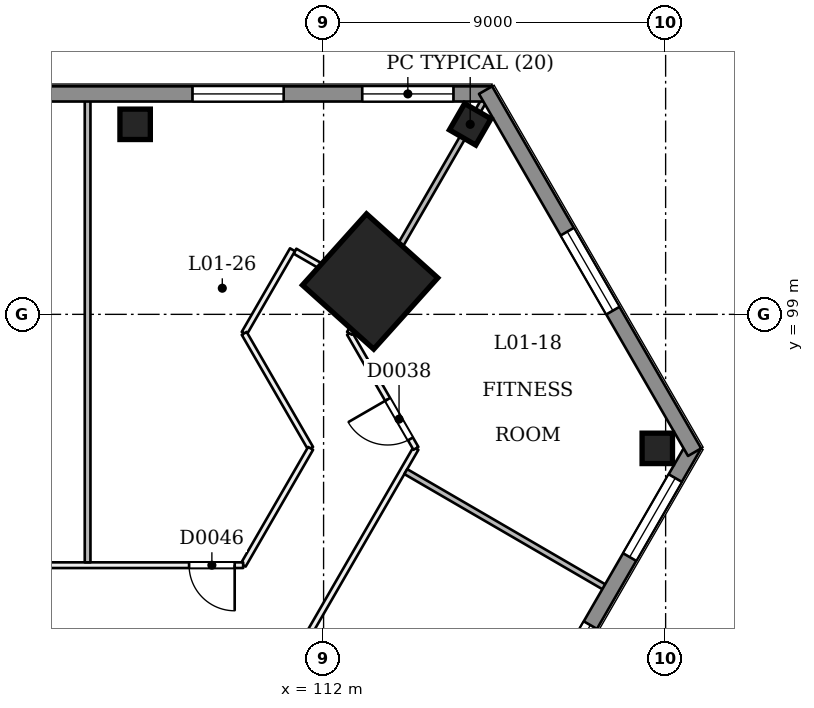
"""IFC4 building model, lengths in metres.
Left out: names, types, materials, properties, quantities, classifications, styles, units other than length and angle.
Written with IfcOpenShell. Run it as: python <this file> out.ifc"""

import sys

from ifc_helpers import new_model, si_unit, direction, frame, frame_2d, origin, origin_2d, place, context, subcontext, project, spatial, rectangle, extrude, element, fill, save


model = new_model("IFC4")
c1 = context("Model", 3, precision=1e-05, world=origin(), true_north=direction((0.0, 1.0)))
c2 = subcontext(c1, "Body", "Model", "MODEL_VIEW")
j1 = project(units=[si_unit("LENGTHUNIT", "METRE"), si_unit("PLANEANGLEUNIT", "RADIAN")], contexts=[c1])
p1 = place(None, origin())
s1 = spatial("IfcSite", under=j1, at=p1, CompositionType="ELEMENT")
p2 = place(p1, origin())
s2 = spatial("IfcBuilding", under=s1, at=p2, CompositionType="ELEMENT")
p3 = place(p2, frame((0.0, 0.0, 9.0)))
s3 = spatial("IfcBuildingStorey", under=s2, at=p3, CompositionType="ELEMENT", Elevation=9.0)
p4 = place(p3, frame((113.259, 99.853, 0.0), z_axis=(-0.028416130736, 0.009218973712, 0.999553667412), x_axis=(0.500876370668, -0.86523358539, 0.022219451375)))
e1 = element("IfcColumn", 1, at=p4, inside=s3, PredefinedType="COLUMN", context=c2, shape_type="SweptSolid", body=[
    extrude(rectangle(XDim=2.52, YDim=2.52, at=origin_2d()), origin(), (0.0, 0.0, 1.0), 4.502),
])
for number, where, z_axis, x_axis in (
    (2, (115.858, 104.0, 0.0), (0.0, 0.0, 1.0), (0.5, 0.866, 0.0)),
    (3, (107.041, 104.0, 0.0), (0.0, 0.0, 1.0), (1.0, 0.0, 0.0)),
    (4, (120.781, 95.474, 0.0), (0.0, 0.0, 1.0), (1.745e-08, 1.0, 0.0)),
):
    element("IfcColumn", number, at=place(p3, frame(where, z_axis=z_axis, x_axis=x_axis)), inside=s3, PredefinedType="COLUMN", context=c2, shape_type="SweptSolid", body=[
        extrude(rectangle(XDim=0.8, YDim=0.8, at=origin_2d()), origin(), (0.0, 0.0, 1.0), 4.5),
    ])
p5 = place(p3, frame((86.747, 47.526, 0.0), z_axis=(0.0, 0.0, 1.0), x_axis=(0.500000085768, 0.866025354266, 0.0)))
e5 = element("IfcWall", 5, at=p5, inside=s3, PredefinedType="PARTITIONING", context=c2, shape_type="SweptSolid", body=[
    extrude(rectangle(XDim=55.365, YDim=0.15, at=frame_2d((27.682, 0.0))), origin(), (0.0, 0.0, 1.0), 4.05),
])
p6 = place(p5, frame((0.97, 0.0, 0.0)))
e6 = element("IfcOpeningElement", 6, at=p6, cuts=e5, PredefinedType="OPENING", context=c2, shape_type="SweptSolid", body=[
    extrude(rectangle(XDim=1.2, YDim=2.1, at=frame_2d((0.6, 1.05))), frame((0.0, 0.085, 0.0), z_axis=(0.0, -1.0, 0.0), x_axis=(1.0, 0.0, 0.0)), (0.0, 0.0, 1.0), 0.171),
])
p7 = place(p5, frame((9.082, 0.0, 0.0)))
e7 = element("IfcOpeningElement", 7, at=p7, cuts=e5, PredefinedType="OPENING", context=c2, shape_type="SweptSolid", body=[
    extrude(rectangle(XDim=1.2, YDim=2.1, at=frame_2d((0.6, 1.05))), frame((0.0, 0.085, 0.0), z_axis=(0.0, -1.0, 0.0), x_axis=(1.0, 0.0, 0.0)), (0.0, 0.0, 1.0), 0.171),
])
p8 = place(p5, frame((18.082, 0.0, 0.0)))
e8 = element("IfcOpeningElement", 8, at=p8, cuts=e5, PredefinedType="OPENING", context=c2, shape_type="SweptSolid", body=[
    extrude(rectangle(XDim=1.2, YDim=2.1, at=frame_2d((0.6, 1.05))), frame((0.0, 0.085, 0.0), z_axis=(0.0, -1.0, 0.0), x_axis=(1.0, 0.0, 0.0)), (0.0, 0.0, 1.0), 0.171),
])
p9 = place(p5, frame((23.613, 0.0, 0.0)))
e9 = element("IfcOpeningElement", 9, at=p9, cuts=e5, PredefinedType="OPENING", context=c2, shape_type="SweptSolid", body=[
    extrude(rectangle(XDim=1.0, YDim=2.1, at=frame_2d((0.5, 1.05))), frame((0.0, 0.085, 0.0), z_axis=(0.0, -1.0, 0.0), x_axis=(1.0, 0.0, 0.0)), (0.0, 0.0, 1.0), 0.171),
])
p10 = place(p5, frame((26.363, 0.0, 0.0)))
e10 = element("IfcOpeningElement", 10, at=p10, cuts=e5, PredefinedType="OPENING", context=c2, shape_type="SweptSolid", body=[
    extrude(rectangle(XDim=1.0, YDim=2.1, at=frame_2d((0.5, 1.05))), frame((0.0, 0.085, 0.0), z_axis=(0.0, -1.0, 0.0), x_axis=(1.0, 0.0, 0.0)), (0.0, 0.0, 1.0), 0.171),
])
p11 = place(p5, frame((33.032, 0.0, 0.0)))
e11 = element("IfcOpeningElement", 11, at=p11, cuts=e5, PredefinedType="OPENING", context=c2, shape_type="SweptSolid", body=[
    extrude(rectangle(XDim=1.2, YDim=2.1, at=frame_2d((0.6, 1.05))), frame((0.0, 0.085, 0.0), z_axis=(0.0, -1.0, 0.0), x_axis=(1.0, 0.0, 0.0)), (0.0, 0.0, 1.0), 0.171),
])
p12 = place(p5, frame((47.337, 0.0, 0.0)))
e12 = element("IfcOpeningElement", 12, at=p12, cuts=e5, PredefinedType="OPENING", context=c2, shape_type="SweptSolid", body=[
    extrude(rectangle(XDim=1.2, YDim=2.1, at=frame_2d((0.6, 1.05))), frame((0.0, 0.085, 0.0), z_axis=(0.0, -1.0, 0.0), x_axis=(1.0, 0.0, 0.0)), (0.0, 0.0, 1.0), 0.171),
])
p13 = place(p3, frame((114.43, 95.474, 0.0), z_axis=(0.0, 0.0, 1.0), x_axis=(-0.500008701212, 0.866020380079, 0.0)))
e13 = element("IfcWall", 13, at=p13, inside=s3, PredefinedType="PARTITIONING", context=c2, shape_type="SweptSolid", body=[
    extrude(rectangle(XDim=3.495, YDim=0.15, at=frame_2d((1.747, 0.0))), origin(), (0.0, 0.0, 1.0), 4.05),
])
p14 = place(p13, frame((0.288, 0.0, 0.0)))
e14 = element("IfcOpeningElement", 14, at=p14, cuts=e13, PredefinedType="OPENING", context=c2, shape_type="SweptSolid", body=[
    extrude(rectangle(XDim=1.2, YDim=2.1, at=frame_2d((0.6, 1.05))), frame((0.0, 0.085, 0.0), z_axis=(0.0, -1.0, 0.0), x_axis=(1.0, 0.0, 0.0)), (0.0, 0.0, 1.0), 0.171),
])
p15 = place(p3, frame((112.682, 98.5, 0.0), z_axis=(0.0, 0.0, 1.0), x_axis=(0.500126914667, 0.865952117167, 0.0)))
e15 = element("IfcWall", 15, at=p15, inside=s3, PredefinedType="PARTITIONING", context=c2, shape_type="SweptSolid", body=[
    extrude(rectangle(XDim=1.08, YDim=0.15, at=frame_2d((0.54, 0.0))), origin(), (0.0, 0.0, 1.0), 4.05),
])
p16 = place(p3, frame((113.195, 99.538, 0.0), z_axis=(0.0, 0.0, 1.0), x_axis=(-0.866017533419, 0.500013631625, 0.0)))
e16 = element("IfcWall", 16, at=p16, inside=s3, PredefinedType="PARTITIONING", context=c2, shape_type="SweptSolid", body=[
    extrude(rectangle(XDim=2.25, YDim=0.15, at=frame_2d((1.125, 0.0))), origin(), (0.0, 0.0, 1.0), 4.05),
])
p17 = place(p3, frame((111.181, 100.7, 0.0), z_axis=(0.0, 0.0, 1.0), x_axis=(-0.500035802948, -0.866004731956, 0.0)))
e17 = element("IfcWall", 17, at=p17, inside=s3, PredefinedType="PARTITIONING", context=c2, shape_type="SweptSolid", body=[
    extrude(rectangle(XDim=2.54, YDim=0.15, at=frame_2d((1.27, 0.0))), origin(), (0.0, 0.0, 1.0), 4.05),
])
p18 = place(p3, frame((109.911, 98.5, 0.0), z_axis=(0.0, 0.0, 1.0), x_axis=(0.500008701212, -0.866020380079, 0.0)))
e18 = element("IfcWall", 18, at=p18, inside=s3, PredefinedType="PARTITIONING", context=c2, shape_type="SweptSolid", body=[
    extrude(rectangle(XDim=3.495, YDim=0.15, at=frame_2d((1.747, 0.0))), origin(), (0.0, 0.0, 1.0), 4.05),
])
p19 = place(p3, frame((111.658, 95.474, 0.0), z_axis=(0.0, 0.0, 1.0), x_axis=(-0.500008260065, -0.866020634781, 0.0)))
e19 = element("IfcWall", 19, at=p19, inside=s3, PredefinedType="PARTITIONING", context=c2, shape_type="SweptSolid", body=[
    extrude(rectangle(XDim=3.549, YDim=0.15, at=frame_2d((1.775, 0.0))), origin(), (0.0, 0.0, 1.0), 4.05),
])
p20 = place(p3, frame((109.884, 92.4, 0.0), z_axis=(0.0, 0.0, 1.0), x_axis=(-1.0, 0.0, 0.0)))
e20 = element("IfcWall", 20, at=p20, inside=s3, PredefinedType="PARTITIONING", context=c2, shape_type="SweptSolid", body=[
    extrude(rectangle(XDim=10.084, YDim=0.15, at=frame_2d((5.042, 0.0))), origin(), (0.0, 0.0, 1.0), 4.05),
])
p21 = place(p20, frame((0.223, 0.0, 0.0)))
e21 = element("IfcOpeningElement", 21, at=p21, cuts=e20, PredefinedType="OPENING", context=c2, shape_type="SweptSolid", body=[
    extrude(rectangle(XDim=1.2, YDim=2.1, at=frame_2d((0.6, 1.05))), frame((0.0, 0.085, 0.0), z_axis=(0.0, -1.0, 0.0), x_axis=(1.0, 0.0, 0.0)), (0.0, 0.0, 1.0), 0.171),
])
p22 = place(p20, frame((6.796, 0.0, 0.0)))
e22 = element("IfcOpeningElement", 22, at=p22, cuts=e20, PredefinedType="OPENING", context=c2, shape_type="SweptSolid", body=[
    extrude(rectangle(XDim=1.2, YDim=2.1, at=frame_2d((0.6, 1.05))), frame((0.0, 0.085, 0.0), z_axis=(0.0, -1.0, 0.0), x_axis=(1.0, 0.0, 0.0)), (0.0, 0.0, 1.0), 0.171),
])
p23 = place(p3, frame((119.631, 91.683, 0.0), z_axis=(0.0, 0.0, 1.0), x_axis=(-0.864489243455, 0.502651318462, 0.0)))
e23 = element("IfcWall", 23, at=p23, inside=s3, PredefinedType="PARTITIONING", context=c2, shape_type="SweptSolid", body=[
    extrude(rectangle(XDim=6.325, YDim=0.15, at=frame_2d((3.163, 0.0))), origin(), (0.0, 0.0, 1.0), 4.05),
])
p24 = place(p3, frame((116.377, 104.9, 0.0), z_axis=(0.0, 0.0, 1.0), x_axis=(-0.500004896655, -0.866022576681, 0.0)))
e24 = element("IfcWall", 24, at=p24, inside=s3, PredefinedType="PARTITIONING", context=c2, shape_type="SweptSolid", body=[
    extrude(rectangle(XDim=6.235, YDim=0.15, at=frame_2d((3.118, 0.0))), origin(), (0.0, 0.0, 1.0), 4.05),
])
p25 = place(p3, frame((105.791, 104.9, 0.0), z_axis=(0.0, 0.0, 1.0), x_axis=(0.0, -1.0, 0.0)))
e25 = element("IfcWall", 25, at=p25, inside=s3, PredefinedType="PARTITIONING", context=c2, shape_type="SweptSolid", body=[
    extrude(rectangle(XDim=12.425, YDim=0.15, at=frame_2d((6.212, 0.0))), origin(), (0.0, 0.0, 1.0), 4.05),
])
p26 = place(p3, frame((53.565, 104.8, 0.0), z_axis=(0.0, 0.0, 1.0), x_axis=(1.0, 0.0, 0.0)))
e26 = element("IfcWall", 26, at=p26, inside=s3, PredefinedType="SOLIDWALL", context=c2, shape_type="SweptSolid", body=[
    extrude(rectangle(XDim=62.871, YDim=0.4, at=frame_2d((31.435, 0.0))), origin(), (0.0, 0.0, 1.0), 4.05),
])
p27 = place(p26, frame((59.452, 0.0, 0.9)))
e27 = element("IfcOpeningElement", 27, at=p27, cuts=e26, PredefinedType="OPENING", context=c2, shape_type="SweptSolid", body=[
    extrude(rectangle(XDim=2.4, YDim=1.5, at=frame_2d((1.2, 0.75))), frame((0.0, 0.21, 0.0), z_axis=(0.0, -1.0, 0.0), x_axis=(1.0, 0.0, 0.0)), (0.0, 0.0, 1.0), 0.421),
])
p28 = place(p26, frame((54.986, 0.0, 0.9)))
e28 = element("IfcOpeningElement", 28, at=p28, cuts=e26, PredefinedType="OPENING", context=c2, shape_type="SweptSolid", body=[
    extrude(rectangle(XDim=2.4, YDim=1.5, at=frame_2d((1.2, 0.75))), frame((0.0, 0.21, 0.0), z_axis=(0.0, -1.0, 0.0), x_axis=(1.0, 0.0, 0.0)), (0.0, 0.0, 1.0), 0.421),
])
p29 = place(p26, frame((45.986, 0.0, 0.9)))
e29 = element("IfcOpeningElement", 29, at=p29, cuts=e26, PredefinedType="OPENING", context=c2, shape_type="SweptSolid", body=[
    extrude(rectangle(XDim=2.4, YDim=1.5, at=frame_2d((1.2, 0.75))), frame((0.0, 0.21, 0.0), z_axis=(0.0, -1.0, 0.0), x_axis=(1.0, 0.0, 0.0)), (0.0, 0.0, 1.0), 0.421),
])
p30 = place(p26, frame((14.486, 0.0, 0.9)))
e30 = element("IfcOpeningElement", 30, at=p30, cuts=e26, PredefinedType="OPENING", context=c2, shape_type="SweptSolid", body=[
    extrude(rectangle(XDim=2.4, YDim=1.5, at=frame_2d((1.2, 0.75))), frame((0.0, 0.21, 0.0), z_axis=(0.0, -1.0, 0.0), x_axis=(1.0, 0.0, 0.0)), (0.0, 0.0, 1.0), 0.421),
])
p31 = place(p26, frame((1.018, 0.0, 0.9)))
e31 = element("IfcOpeningElement", 31, at=p31, cuts=e26, PredefinedType="OPENING", context=c2, shape_type="SweptSolid", body=[
    extrude(rectangle(XDim=2.4, YDim=1.5, at=frame_2d((1.2, 0.75))), frame((0.0, 0.21, 0.0), z_axis=(0.0, -1.0, 0.0), x_axis=(1.0, 0.0, 0.0)), (0.0, 0.0, 1.0), 0.421),
])
p32 = place(p3, frame((121.762, 95.574, 0.0), z_axis=(0.0, 0.0, 1.0), x_axis=(-0.499997306052, -0.866026959131, 0.0)))
e32 = element("IfcWall", 32, at=p32, inside=s3, PredefinedType="SOLIDWALL", context=c2, shape_type="SweptSolid", body=[
    extrude(rectangle(XDim=62.87, YDim=0.4, at=frame_2d((31.435, 0.0))), origin(), (0.0, 0.0, 1.0), 4.05),
])
p33 = place(p32, frame((59.452, 0.0, 0.9)))
e33 = element("IfcOpeningElement", 33, at=p33, cuts=e32, PredefinedType="OPENING", context=c2, shape_type="SweptSolid", body=[
    extrude(rectangle(XDim=2.4, YDim=1.5, at=frame_2d((1.2, 0.75))), frame((0.0, 0.21, 0.0), z_axis=(0.0, -1.0, 0.0), x_axis=(1.0, 0.0, 0.0)), (0.0, 0.0, 1.0), 0.421),
])
p34 = place(p32, frame((54.986, 0.0, 0.9)))
e34 = element("IfcOpeningElement", 34, at=p34, cuts=e32, PredefinedType="OPENING", context=c2, shape_type="SweptSolid", body=[
    extrude(rectangle(XDim=2.4, YDim=1.5, at=frame_2d((1.2, 0.75))), frame((0.0, 0.21, 0.0), z_axis=(0.0, -1.0, 0.0), x_axis=(1.0, 0.0, 0.0)), (0.0, 0.0, 1.0), 0.421),
])
p35 = place(p32, frame((50.486, 0.0, 0.9)))
e35 = element("IfcOpeningElement", 35, at=p35, cuts=e32, PredefinedType="OPENING", context=c2, shape_type="SweptSolid", body=[
    extrude(rectangle(XDim=2.4, YDim=1.5, at=frame_2d((1.2, 0.75))), frame((0.0, 0.21, 0.0), z_axis=(0.0, -1.0, 0.0), x_axis=(1.0, 0.0, 0.0)), (0.0, 0.0, 1.0), 0.421),
])
p36 = place(p32, frame((45.986, 0.0, 0.9)))
e36 = element("IfcOpeningElement", 36, at=p36, cuts=e32, PredefinedType="OPENING", context=c2, shape_type="SweptSolid", body=[
    extrude(rectangle(XDim=2.4, YDim=1.5, at=frame_2d((1.2, 0.75))), frame((0.0, 0.21, 0.0), z_axis=(0.0, -1.0, 0.0), x_axis=(1.0, 0.0, 0.0)), (0.0, 0.0, 1.0), 0.421),
])
p37 = place(p32, frame((41.486, 0.0, 0.9)))
e37 = element("IfcOpeningElement", 37, at=p37, cuts=e32, PredefinedType="OPENING", context=c2, shape_type="SweptSolid", body=[
    extrude(rectangle(XDim=2.4, YDim=1.5, at=frame_2d((1.2, 0.75))), frame((0.0, 0.21, 0.0), z_axis=(0.0, -1.0, 0.0), x_axis=(1.0, 0.0, 0.0)), (0.0, 0.0, 1.0), 0.421),
])
p38 = place(p32, frame((36.986, 0.0, 0.9)))
e38 = element("IfcOpeningElement", 38, at=p38, cuts=e32, PredefinedType="OPENING", context=c2, shape_type="SweptSolid", body=[
    extrude(rectangle(XDim=2.4, YDim=1.5, at=frame_2d((1.2, 0.75))), frame((0.0, 0.21, 0.0), z_axis=(0.0, -1.0, 0.0), x_axis=(1.0, 0.0, 0.0)), (0.0, 0.0, 1.0), 0.421),
])
p39 = place(p32, frame((23.486, 0.0, 0.9)))
e39 = element("IfcOpeningElement", 39, at=p39, cuts=e32, PredefinedType="OPENING", context=c2, shape_type="SweptSolid", body=[
    extrude(rectangle(XDim=2.4, YDim=1.5, at=frame_2d((1.2, 0.75))), frame((0.0, 0.21, 0.0), z_axis=(0.0, -1.0, 0.0), x_axis=(1.0, 0.0, 0.0)), (0.0, 0.0, 1.0), 0.421),
])
p40 = place(p32, frame((18.986, 0.0, 0.9)))
e40 = element("IfcOpeningElement", 40, at=p40, cuts=e32, PredefinedType="OPENING", context=c2, shape_type="SweptSolid", body=[
    extrude(rectangle(XDim=2.4, YDim=1.5, at=frame_2d((1.2, 0.75))), frame((0.0, 0.21, 0.0), z_axis=(0.0, -1.0, 0.0), x_axis=(1.0, 0.0, 0.0)), (0.0, 0.0, 1.0), 0.421),
])
p41 = place(p32, frame((14.486, 0.0, 0.9)))
e41 = element("IfcOpeningElement", 41, at=p41, cuts=e32, PredefinedType="OPENING", context=c2, shape_type="SweptSolid", body=[
    extrude(rectangle(XDim=2.4, YDim=1.5, at=frame_2d((1.2, 0.75))), frame((0.0, 0.21, 0.0), z_axis=(0.0, -1.0, 0.0), x_axis=(1.0, 0.0, 0.0)), (0.0, 0.0, 1.0), 0.421),
])
p42 = place(p32, frame((5.486, 0.0, 0.9)))
e42 = element("IfcOpeningElement", 42, at=p42, cuts=e32, PredefinedType="OPENING", context=c2, shape_type="SweptSolid", body=[
    extrude(rectangle(XDim=2.4, YDim=1.5, at=frame_2d((1.2, 0.75))), frame((0.0, 0.21, 0.0), z_axis=(0.0, -1.0, 0.0), x_axis=(1.0, 0.0, 0.0)), (0.0, 0.0, 1.0), 0.421),
])
p43 = place(p32, frame((1.018, 0.0, 0.9)))
e43 = element("IfcOpeningElement", 43, at=p43, cuts=e32, PredefinedType="OPENING", context=c2, shape_type="SweptSolid", body=[
    extrude(rectangle(XDim=2.4, YDim=1.5, at=frame_2d((1.2, 0.75))), frame((0.0, 0.21, 0.0), z_axis=(0.0, -1.0, 0.0), x_axis=(1.0, 0.0, 0.0)), (0.0, 0.0, 1.0), 0.421),
])
p44 = place(p3, frame((116.262, 104.9, 0.0), z_axis=(0.0, 0.0, 1.0), x_axis=(0.50000615651, -0.866021849293, 0.0)))
e44 = element("IfcWall", 44, at=p44, inside=s3, PredefinedType="SOLIDWALL", context=c2, shape_type="SweptSolid", body=[
    extrude(rectangle(XDim=11.0, YDim=0.4, at=frame_2d((5.5, 0.0))), origin(), (0.0, 0.0, 1.0), 4.05),
])
p45 = place(p44, frame((4.3, 0.0, 0.9)))
e45 = element("IfcOpeningElement", 45, at=p45, cuts=e44, PredefinedType="OPENING", context=c2, shape_type="SweptSolid", body=[
    extrude(rectangle(XDim=2.4, YDim=1.5, at=frame_2d((1.2, 0.75))), frame((0.0, 0.21, 0.0), z_axis=(0.0, -1.0, 0.0), x_axis=(1.0, 0.0, 0.0)), (0.0, 0.0, 1.0), 0.421),
])
p46 = place(p14, origin())
e46 = element("IfcDoor", 46, at=p46, inside=s3, OperationType="SINGLE_SWING_RIGHT", PredefinedType="NOTDEFINED", context=c2, shape_type="SweptSolid", body=[
    extrude(rectangle(XDim=1.2, YDim=2.1, at=frame_2d((0.6, 1.05))), frame((0.0, 0.025, 0.0), z_axis=(0.0, -1.0, 0.0), x_axis=(1.0, 0.0, 0.0)), (0.0, 0.0, 1.0), 0.05),
])
fill(e14, e46)
p47 = place(p21, origin())
e47 = element("IfcDoor", 47, at=p47, inside=s3, OperationType="SINGLE_SWING_LEFT", PredefinedType="NOTDEFINED", context=c2, shape_type="SweptSolid", body=[
    extrude(rectangle(XDim=1.2, YDim=2.1, at=frame_2d((0.6, 1.05))), frame((0.0, 0.025, 0.0), z_axis=(0.0, -1.0, 0.0), x_axis=(1.0, 0.0, 0.0)), (0.0, 0.0, 1.0), 0.05),
])
fill(e21, e47)
p48 = place(p27, origin())
e48 = element("IfcWindow", 48, at=p48, inside=s3, PartitioningType="SINGLE_PANEL", PredefinedType="WINDOW", context=c2, shape_type="SweptSolid", body=[
    extrude(rectangle(XDim=2.4, YDim=1.5, at=frame_2d((1.2, 0.75))), frame((0.0, 0.03, 0.0), z_axis=(0.0, -1.0, 0.0), x_axis=(1.0, 0.0, 0.0)), (0.0, 0.0, 1.0), 0.06),
])
fill(e27, e48)
p49 = place(p28, origin())
e49 = element("IfcWindow", 49, at=p49, inside=s3, PartitioningType="SINGLE_PANEL", PredefinedType="WINDOW", context=c2, shape_type="SweptSolid", body=[
    extrude(rectangle(XDim=2.4, YDim=1.5, at=frame_2d((1.2, 0.75))), frame((0.0, 0.03, 0.0), z_axis=(0.0, -1.0, 0.0), x_axis=(1.0, 0.0, 0.0)), (0.0, 0.0, 1.0), 0.06),
])
fill(e28, e49)
p50 = place(p42, origin())
e50 = element("IfcWindow", 50, at=p50, inside=s3, PartitioningType="SINGLE_PANEL", PredefinedType="WINDOW", context=c2, shape_type="SweptSolid", body=[
    extrude(rectangle(XDim=2.4, YDim=1.5, at=frame_2d((1.2, 0.75))), frame((0.0, 0.03, 0.0), z_axis=(0.0, -1.0, 0.0), x_axis=(1.0, 0.0, 0.0)), (0.0, 0.0, 1.0), 0.06),
])
fill(e42, e50)
p51 = place(p43, origin())
e51 = element("IfcWindow", 51, at=p51, inside=s3, PartitioningType="SINGLE_PANEL", PredefinedType="WINDOW", context=c2, shape_type="SweptSolid", body=[
    extrude(rectangle(XDim=2.4, YDim=1.5, at=frame_2d((1.2, 0.75))), frame((0.0, 0.03, 0.0), z_axis=(0.0, -1.0, 0.0), x_axis=(1.0, 0.0, 0.0)), (0.0, 0.0, 1.0), 0.06),
])
fill(e43, e51)
p52 = place(p45, origin())
e52 = element("IfcWindow", 52, at=p52, inside=s3, PartitioningType="SINGLE_PANEL", PredefinedType="WINDOW", context=c2, shape_type="SweptSolid", body=[
    extrude(rectangle(XDim=2.4, YDim=1.5, at=frame_2d((1.2, 0.75))), frame((0.0, 0.03, 0.0), z_axis=(0.0, -1.0, 0.0), x_axis=(1.0, 0.0, 0.0)), (0.0, 0.0, 1.0), 0.06),
])
fill(e45, e52)
save(model, sys.argv[1])
